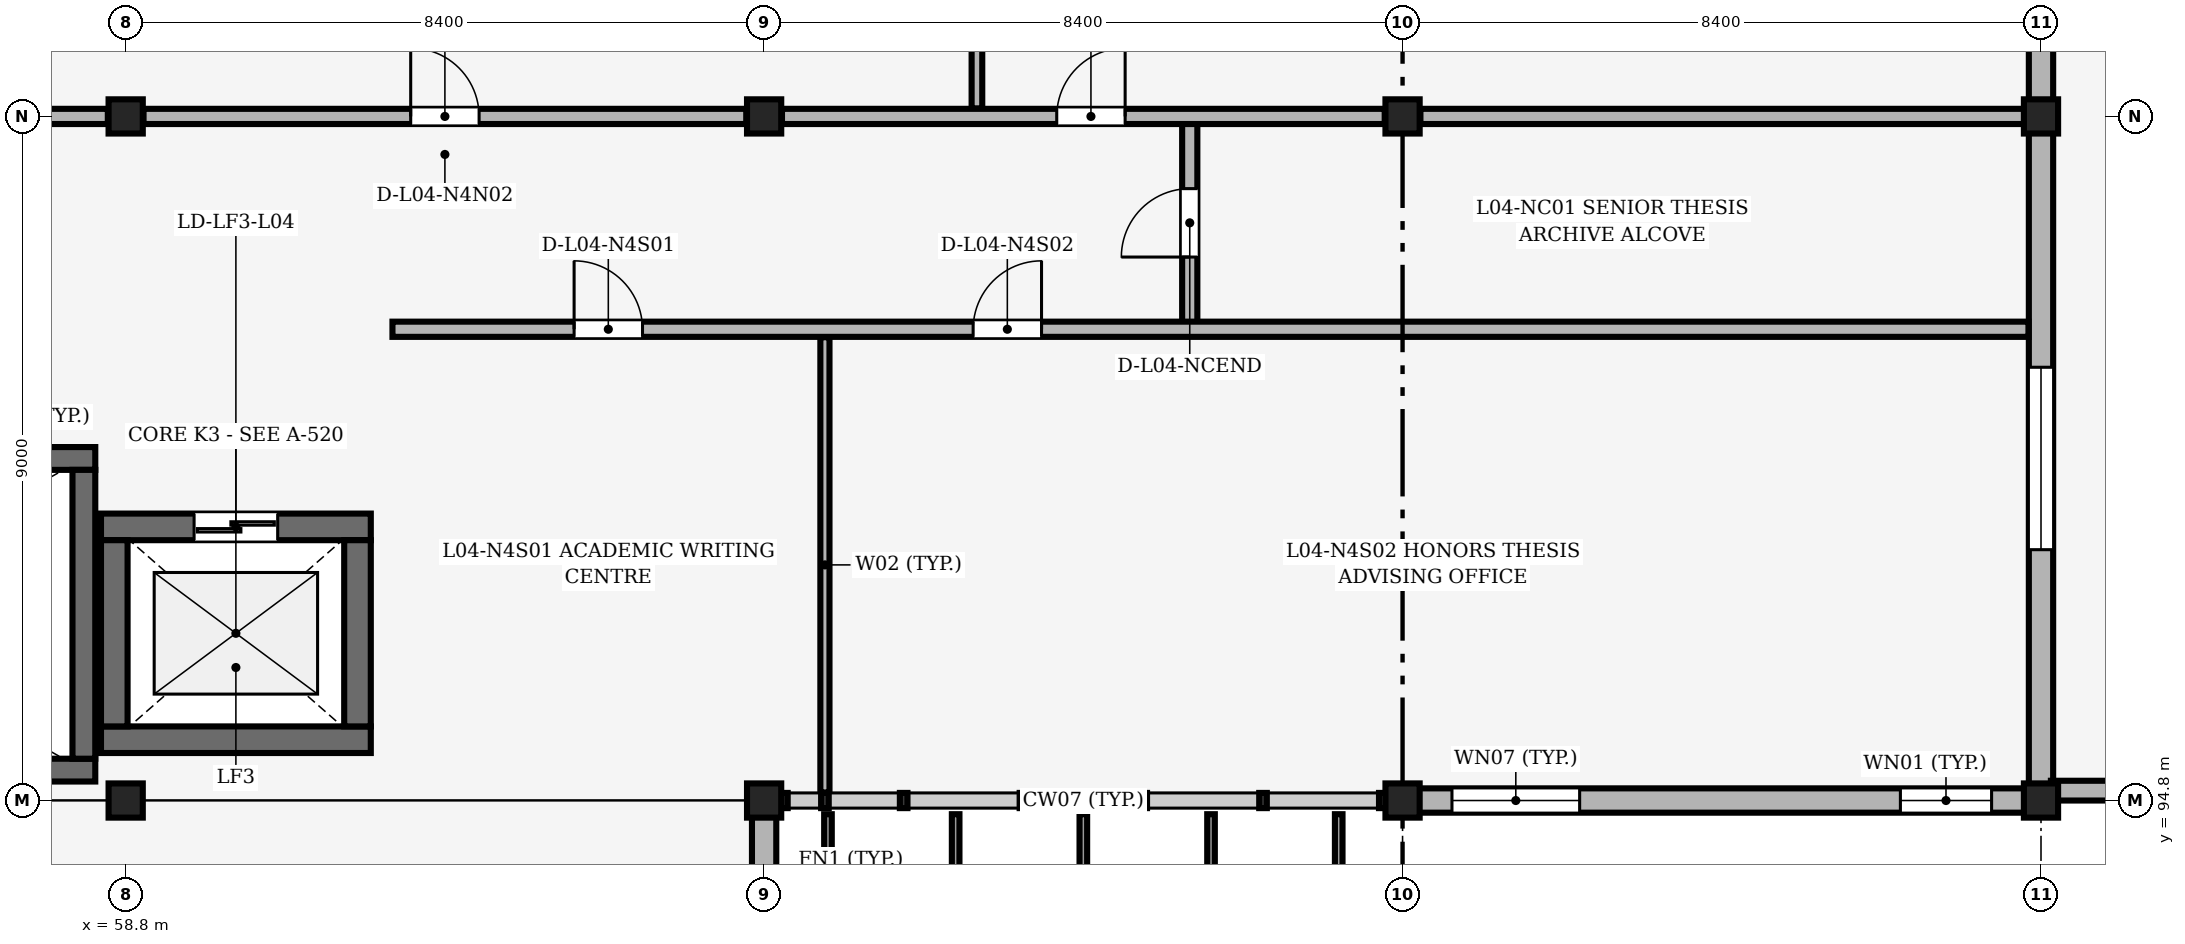
"""IFC4 building model, lengths in metres.
Left out: names, types, materials, properties, quantities, classifications, styles, units other than length and angle.
Written with IfcOpenShell. Run it as: python <this file> out.ifc"""

import sys

from ifc_helpers import new_model, si_unit, direction, frame, frame_2d, origin, origin_2d, place, context, subcontext, project, spatial, rectangle, extrude, element, fill, save


model = new_model("IFC4")
c1 = context("Model", 3, precision=1e-05, world=origin(), true_north=direction((0.0, 1.0)))
c2 = subcontext(c1, "Body", "Model", "MODEL_VIEW")
j1 = project(units=[si_unit("LENGTHUNIT", "METRE"), si_unit("PLANEANGLEUNIT", "RADIAN")], contexts=[c1])
p1 = place(None, origin())
s1 = spatial("IfcSite", under=j1, at=p1, CompositionType="ELEMENT")
p2 = place(p1, origin())
s2 = spatial("IfcBuilding", under=s1, at=p2, CompositionType="ELEMENT")
p3 = place(p2, frame((0.0, 0.0, 17.4)))
s3 = spatial("IfcBuildingStorey", under=s2, at=p3, CompositionType="ELEMENT", Elevation=17.4)
for number, where, z_axis, x_axis in (
    (1, (58.8, 94.8, 0.0), (0.0, 0.0, 1.0), (1.0, 0.0, 0.0)),
    (2, (58.8, 103.8, 0.0), (0.0, 0.0, 1.0), (1.0, 0.0, 0.0)),
    (3, (67.2, 94.8, 0.0), (0.0, 0.0, 1.0), (1.0, 0.0, 0.0)),
    (4, (67.2, 103.8, 0.0), (0.0, 0.0, 1.0), (1.0, 0.0, 0.0)),
    (5, (75.6, 94.8, 0.0), (0.0, 0.0, 1.0), (1.0, 0.0, 0.0)),
    (6, (75.6, 103.8, 0.0), (0.0, 0.0, 1.0), (1.0, 0.0, 0.0)),
    (7, (84.0, 94.8, 0.0), (0.0, 0.0, 1.0), (1.0, 0.0, 0.0)),
    (8, (84.0, 103.8, 0.0), (0.0, 0.0, 1.0), (1.0, 0.0, 0.0)),
):
    element("IfcColumn", number, at=place(p3, frame(where, z_axis=z_axis, x_axis=x_axis)), inside=s3, PredefinedType="COLUMN", context=c2, shape_type="SweptSolid", body=[
        extrude(rectangle(XDim=0.45, YDim=0.45, at=origin_2d()), origin(), (0.0, 0.0, 1.0), 4.2),
    ])
p4 = place(p3, frame((67.2, 86.0, 0.0), z_axis=(0.0, 0.0, 1.0), x_axis=(0.0, 1.0, 0.0)))
e9 = element("IfcWall", 9, at=p4, inside=s3, PredefinedType="SOLIDWALL", context=c2, shape_type="SweptSolid", body=[
    extrude(rectangle(XDim=8.6, YDim=0.32, at=frame_2d((4.3, 0.0))), origin(), (0.0, 0.0, 1.0), 3.43),
])
p5 = place(p4, frame((3.1, 0.0, 0.9)))
e10 = element("IfcOpeningElement", 10, at=p5, cuts=e9, PredefinedType="OPENING", context=c2, shape_type="SweptSolid", body=[
    extrude(rectangle(XDim=2.4, YDim=1.8, at=frame_2d((1.2, 0.9))), frame((0.0, 0.17, 0.0), z_axis=(0.0, -1.0, 0.0), x_axis=(1.0, 0.0, 0.0)), (0.0, 0.0, 1.0), 0.34),
])
p6 = place(p3, frame((75.8, 94.8, 0.0), z_axis=(0.0, 0.0, 1.0), x_axis=(1.0, 0.0, 0.0)))
e11 = element("IfcWall", 11, at=p6, inside=s3, PredefinedType="SOLIDWALL", context=c2, shape_type="SweptSolid", body=[
    extrude(rectangle(XDim=8.0, YDim=0.32, at=frame_2d((4.0, 0.0))), origin(), (0.0, 0.0, 1.0), 3.48),
])
p7 = place(p6, frame((0.45, 0.0, 0.9)))
e12 = element("IfcOpeningElement", 12, at=p7, cuts=e11, PredefinedType="OPENING", context=c2, shape_type="SweptSolid", body=[
    extrude(rectangle(XDim=1.68, YDim=2.4, at=frame_2d((0.84, 1.2))), frame((0.0, 0.17, 0.0), z_axis=(0.0, -1.0, 0.0), x_axis=(1.0, 0.0, 0.0)), (0.0, 0.0, 1.0), 0.34),
])
p8 = place(p6, frame((6.35, 0.0, 0.9)))
e13 = element("IfcOpeningElement", 13, at=p8, cuts=e11, PredefinedType="OPENING", context=c2, shape_type="SweptSolid", body=[
    extrude(rectangle(XDim=1.2, YDim=1.5, at=frame_2d((0.6, 0.75))), frame((0.0, 0.17, 0.0), z_axis=(0.0, -1.0, 0.0), x_axis=(1.0, 0.0, 0.0)), (0.0, 0.0, 1.0), 0.34),
])
p9 = place(p3, frame((84.0, 95.0, 0.0), z_axis=(0.0, 0.0, 1.0), x_axis=(0.0, 1.0, 0.0)))
e14 = element("IfcWall", 14, at=p9, inside=s3, PredefinedType="SOLIDWALL", context=c2, shape_type="SweptSolid", body=[
    extrude(rectangle(XDim=8.6, YDim=0.32, at=frame_2d((4.3, 0.0))), origin(), (0.0, 0.0, 1.0), 3.48),
])
p10 = place(p9, frame((3.1, 0.0, 0.9)))
e15 = element("IfcOpeningElement", 15, at=p10, cuts=e14, PredefinedType="OPENING", context=c2, shape_type="SweptSolid", body=[
    extrude(rectangle(XDim=2.4, YDim=1.8, at=frame_2d((1.2, 0.9))), frame((0.0, 0.17, 0.0), z_axis=(0.0, -1.0, 0.0), x_axis=(1.0, 0.0, 0.0)), (0.0, 0.0, 1.0), 0.34),
])
p11 = place(p3, frame((84.0, 104.0, 0.0), z_axis=(0.0, 0.0, 1.0), x_axis=(0.0, 1.0, 0.0)))
e16 = element("IfcWall", 16, at=p11, inside=s3, PredefinedType="SOLIDWALL", context=c2, shape_type="SweptSolid", body=[
    extrude(rectangle(XDim=8.6, YDim=0.32, at=frame_2d((4.3, 0.0))), origin(), (0.0, 0.0, 1.0), 3.43),
])
p12 = place(p11, frame((3.1, 0.0, 0.9)))
e17 = element("IfcOpeningElement", 17, at=p12, cuts=e16, PredefinedType="OPENING", context=c2, shape_type="SweptSolid", body=[
    extrude(rectangle(XDim=2.4, YDim=1.8, at=frame_2d((1.2, 0.9))), frame((0.0, 0.17, 0.0), z_axis=(0.0, -1.0, 0.0), x_axis=(1.0, 0.0, 0.0)), (0.0, 0.0, 1.0), 0.34),
])
p13 = place(p3, frame((84.13, 94.93, 0.0), z_axis=(0.0, 0.0, 1.0), x_axis=(1.0, 0.0, 0.0)))
e18 = element("IfcWall", 18, at=p13, inside=s3, PredefinedType="PARAPET", context=c2, shape_type="SweptSolid", body=[
    extrude(rectangle(XDim=33.34, YDim=0.26, at=frame_2d((16.67, 0.0))), origin(), (0.0, 0.0, 1.0), 0.85),
])
for number, where, z_axis, x_axis in (
    (19, (50.8, 95.2, 0.0), (0.0, 0.0, 1.0), (1.0, 0.0, 0.0)),
    (20, (50.8, 99.3, 0.0), (0.0, 0.0, 1.0), (1.0, 0.0, 0.0)),
):
    element("IfcWall", number, at=place(p3, frame(where, z_axis=z_axis, x_axis=x_axis)), inside=s3, PredefinedType="SHEAR", context=c2, shape_type="SweptSolid", body=[
        extrude(rectangle(XDim=7.6, YDim=0.3, at=frame_2d((3.8, 0.0))), origin(), (0.0, 0.0, 1.0), 4.025),
    ])
p14 = place(p3, frame((58.25, 95.35, 0.0), z_axis=(0.0, 0.0, 1.0), x_axis=(0.0, 1.0, 0.0)))
e21 = element("IfcWall", 21, at=p14, inside=s3, PredefinedType="SHEAR", context=c2, shape_type="SweptSolid", body=[
    extrude(rectangle(XDim=3.8, YDim=0.3, at=frame_2d((1.9, 0.0))), origin(), (0.0, 0.0, 1.0), 4.025),
])
p15 = place(p3, frame((58.475, 95.6, 0.0), z_axis=(0.0, 0.0, 1.0), x_axis=(1.0, 0.0, 0.0)))
e22 = element("IfcWall", 22, at=p15, inside=s3, PredefinedType="SHEAR", context=c2, shape_type="SweptSolid", body=[
    extrude(rectangle(XDim=3.55, YDim=0.35, at=frame_2d((1.775, 0.0))), origin(), (0.0, 0.0, 1.0), 3.92),
])
p16 = place(p3, frame((58.475, 98.4, 0.0), z_axis=(0.0, 0.0, 1.0), x_axis=(1.0, 0.0, 0.0)))
e23 = element("IfcWall", 23, at=p16, inside=s3, PredefinedType="SHEAR", context=c2, shape_type="SweptSolid", body=[
    extrude(rectangle(XDim=3.55, YDim=0.35, at=frame_2d((1.775, 0.0))), origin(), (0.0, 0.0, 1.0), 3.92),
])
p17 = place(p16, frame((1.225, 0.0, 0.0)))
e24 = element("IfcOpeningElement", 24, at=p17, cuts=e23, PredefinedType="OPENING", context=c2, shape_type="SweptSolid", body=[
    extrude(rectangle(XDim=1.1, YDim=2.2, at=frame_2d((0.55, 1.1))), frame((0.0, 0.185, 0.0), z_axis=(0.0, -1.0, 0.0), x_axis=(1.0, 0.0, 0.0)), (0.0, 0.0, 1.0), 0.37),
])
for number, where, z_axis, x_axis in (
    (25, (58.65, 95.775, 0.0), (0.0, 0.0, 1.0), (0.0, 1.0, 0.0)),
    (26, (61.85, 95.775, 0.0), (0.0, 0.0, 1.0), (0.0, 1.0, 0.0)),
):
    element("IfcWall", number, at=place(p3, frame(where, z_axis=z_axis, x_axis=x_axis)), inside=s3, PredefinedType="SHEAR", context=c2, shape_type="SweptSolid", body=[
        extrude(rectangle(XDim=2.45, YDim=0.35, at=frame_2d((1.225, 0.0))), origin(), (0.0, 0.0, 1.0), 3.92),
    ])
p18 = place(p3, frame((72.8, 101.01, 0.0), z_axis=(0.0, 0.0, 1.0), x_axis=(0.0, 1.0, 0.0)))
e27 = element("IfcWall", 27, at=p18, inside=s3, PredefinedType="PARTITIONING", context=c2, shape_type="SweptSolid", body=[
    extrude(rectangle(XDim=2.78, YDim=0.2, at=frame_2d((1.39, 0.0))), origin(), (0.0, 0.0, 1.0), 3.9),
])
p19 = place(p18, frame((0.94, 0.0, 0.0)))
e28 = element("IfcOpeningElement", 28, at=p19, cuts=e27, PredefinedType="OPENING", context=c2, shape_type="SweptSolid", body=[
    extrude(rectangle(XDim=0.9, YDim=2.1, at=frame_2d((0.45, 1.05))), frame((0.0, 0.11, 0.0), z_axis=(0.0, -1.0, 0.0), x_axis=(1.0, 0.0, 0.0)), (0.0, 0.0, 1.0), 0.22),
])
p20 = place(p3, frame((70.0, 103.905, 0.0), z_axis=(0.0, 0.0, 1.0), x_axis=(0.0, 1.0, 0.0)))
e29 = element("IfcWall", 29, at=p20, inside=s3, PredefinedType="PARTITIONING", context=c2, shape_type="SweptSolid", body=[
    extrude(rectangle(XDim=8.73, YDim=0.14, at=frame_2d((4.365, 0.0))), origin(), (0.0, 0.0, 1.0), 3.9),
])
p21 = place(p3, frame((50.635, 103.8, 0.0), z_axis=(0.0, 0.0, 1.0), x_axis=(1.0, 0.0, 0.0)))
e30 = element("IfcWall", 30, at=p21, inside=s3, PredefinedType="PARTITIONING", context=c2, shape_type="SweptSolid", body=[
    extrude(rectangle(XDim=7.93, YDim=0.2, at=frame_2d((3.965, 0.0))), origin(), (0.0, 0.0, 1.0), 3.29),
])
p22 = place(p3, frame((59.035, 103.8, 0.0), z_axis=(0.0, 0.0, 1.0), x_axis=(1.0, 0.0, 0.0)))
e31 = element("IfcWall", 31, at=p22, inside=s3, PredefinedType="PARTITIONING", context=c2, shape_type="SweptSolid", body=[
    extrude(rectangle(XDim=7.93, YDim=0.2, at=frame_2d((3.965, 0.0))), origin(), (0.0, 0.0, 1.0), 3.43),
])
p23 = place(p22, frame((3.515, 0.0, 0.0)))
e32 = element("IfcOpeningElement", 32, at=p23, cuts=e31, PredefinedType="OPENING", context=c2, shape_type="SweptSolid", body=[
    extrude(rectangle(XDim=0.9, YDim=2.1, at=frame_2d((0.45, 1.05))), frame((0.0, 0.11, 0.0), z_axis=(0.0, -1.0, 0.0), x_axis=(1.0, 0.0, 0.0)), (0.0, 0.0, 1.0), 0.22),
])
p24 = place(p3, frame((67.435, 103.8, 0.0), z_axis=(0.0, 0.0, 1.0), x_axis=(1.0, 0.0, 0.0)))
e33 = element("IfcWall", 33, at=p24, inside=s3, PredefinedType="PARTITIONING", context=c2, shape_type="SweptSolid", body=[
    extrude(rectangle(XDim=7.93, YDim=0.2, at=frame_2d((3.965, 0.0))), origin(), (0.0, 0.0, 1.0), 3.48),
])
p25 = place(p24, frame((3.615, 0.0, 0.0)))
e34 = element("IfcOpeningElement", 34, at=p25, cuts=e33, PredefinedType="OPENING", context=c2, shape_type="SweptSolid", body=[
    extrude(rectangle(XDim=0.9, YDim=2.1, at=frame_2d((0.45, 1.05))), frame((0.0, 0.11, 0.0), z_axis=(0.0, -1.0, 0.0), x_axis=(1.0, 0.0, 0.0)), (0.0, 0.0, 1.0), 0.22),
])
p26 = place(p3, frame((75.835, 103.8, 0.0), z_axis=(0.0, 0.0, 1.0), x_axis=(1.0, 0.0, 0.0)))
e35 = element("IfcWall", 35, at=p26, inside=s3, PredefinedType="PARTITIONING", context=c2, shape_type="SweptSolid", body=[
    extrude(rectangle(XDim=8.0, YDim=0.2, at=frame_2d((4.0, 0.0))), origin(), (0.0, 0.0, 1.0), 3.43),
])
p27 = place(p3, frame((68.0, 94.905, 0.0), z_axis=(0.0, 0.0, 1.0), x_axis=(0.0, 1.0, 0.0)))
e36 = element("IfcWall", 36, at=p27, inside=s3, PredefinedType="PARTITIONING", context=c2, shape_type="SweptSolid", body=[
    extrude(rectangle(XDim=5.99, YDim=0.12, at=frame_2d((2.995, 0.0))), origin(), (0.0, 0.0, 1.0), 3.9),
])
p28 = place(p3, frame((62.31, 101.0, 0.0), z_axis=(0.0, 0.0, 1.0), x_axis=(1.0, 0.0, 0.0)))
e37 = element("IfcWall", 37, at=p28, inside=s3, PredefinedType="PARTITIONING", context=c2, shape_type="SweptSolid", body=[
    extrude(rectangle(XDim=21.525, YDim=0.2, at=frame_2d((10.762, 0.0))), origin(), (0.0, 0.0, 1.0), 3.451),
])
p29 = place(p28, frame((2.39, 0.0, 0.0)))
e38 = element("IfcOpeningElement", 38, at=p29, cuts=e37, PredefinedType="OPENING", context=c2, shape_type="SweptSolid", body=[
    extrude(rectangle(XDim=0.9, YDim=2.1, at=frame_2d((0.45, 1.05))), frame((0.0, 0.11, 0.0), z_axis=(0.0, -1.0, 0.0), x_axis=(1.0, 0.0, 0.0)), (0.0, 0.0, 1.0), 0.22),
])
p30 = place(p28, frame((7.64, 0.0, 0.0)))
e39 = element("IfcOpeningElement", 39, at=p30, cuts=e37, PredefinedType="OPENING", context=c2, shape_type="SweptSolid", body=[
    extrude(rectangle(XDim=0.9, YDim=2.1, at=frame_2d((0.45, 1.05))), frame((0.0, 0.11, 0.0), z_axis=(0.0, -1.0, 0.0), x_axis=(1.0, 0.0, 0.0)), (0.0, 0.0, 1.0), 0.22),
])
p31 = place(p7, origin())
e40 = element("IfcWindow", 40, at=p31, inside=s3, PartitioningType="SINGLE_PANEL", PredefinedType="WINDOW", context=c2, shape_type="SweptSolid", body=[
    extrude(rectangle(XDim=1.68, YDim=2.4, at=frame_2d((0.84, 1.2))), frame((0.0, 0.03, 0.0), z_axis=(0.0, -1.0, 0.0), x_axis=(1.0, 0.0, 0.0)), (0.0, 0.0, 1.0), 0.06),
])
fill(e12, e40)
p32 = place(p8, origin())
e41 = element("IfcWindow", 41, at=p32, inside=s3, PartitioningType="SINGLE_PANEL", PredefinedType="WINDOW", context=c2, shape_type="SweptSolid", body=[
    extrude(rectangle(XDim=1.2, YDim=1.5, at=frame_2d((0.6, 0.75))), frame((0.0, 0.03, 0.0), z_axis=(0.0, -1.0, 0.0), x_axis=(1.0, 0.0, 0.0)), (0.0, 0.0, 1.0), 0.06),
])
fill(e13, e41)
p33 = place(p10, origin())
e42 = element("IfcWindow", 42, at=p33, inside=s3, PartitioningType="SINGLE_PANEL", PredefinedType="WINDOW", context=c2, shape_type="SweptSolid", body=[
    extrude(rectangle(XDim=2.4, YDim=1.8, at=frame_2d((1.2, 0.9))), frame((0.0, 0.03, 0.0), z_axis=(0.0, -1.0, 0.0), x_axis=(1.0, 0.0, 0.0)), (0.0, 0.0, 1.0), 0.06),
])
fill(e15, e42)
p34 = place(p17, origin())
e43 = element("IfcDoor", 43, at=p34, inside=s3, OperationType="DOUBLE_DOOR_SLIDING", PredefinedType="DOOR", context=c2, shape_type="SweptSolid", body=[
    extrude(rectangle(XDim=1.1, YDim=2.2, at=frame_2d((0.55, 1.1))), frame((0.0, 0.025, 0.0), z_axis=(0.0, -1.0, 0.0), x_axis=(1.0, 0.0, 0.0)), (0.0, 0.0, 1.0), 0.05),
])
fill(e24, e43)
p35 = place(p19, origin())
e44 = element("IfcDoor", 44, at=p35, inside=s3, OperationType="SINGLE_SWING_LEFT", PredefinedType="DOOR", context=c2, shape_type="SweptSolid", body=[
    extrude(rectangle(XDim=0.9, YDim=2.1, at=frame_2d((0.45, 1.05))), frame((0.0, 0.025, 0.0), z_axis=(0.0, -1.0, 0.0), x_axis=(1.0, 0.0, 0.0)), (0.0, 0.0, 1.0), 0.05),
])
fill(e28, e44)
p36 = place(p23, origin())
e45 = element("IfcDoor", 45, at=p36, inside=s3, OperationType="SINGLE_SWING_LEFT", PredefinedType="DOOR", context=c2, shape_type="SweptSolid", body=[
    extrude(rectangle(XDim=0.9, YDim=2.1, at=frame_2d((0.45, 1.05))), frame((0.0, 0.025, 0.0), z_axis=(0.0, -1.0, 0.0), x_axis=(1.0, 0.0, 0.0)), (0.0, 0.0, 1.0), 0.05),
])
fill(e32, e45)
p37 = place(p25, origin())
e46 = element("IfcDoor", 46, at=p37, inside=s3, OperationType="SINGLE_SWING_RIGHT", PredefinedType="DOOR", context=c2, shape_type="SweptSolid", body=[
    extrude(rectangle(XDim=0.9, YDim=2.1, at=frame_2d((0.45, 1.05))), frame((0.0, 0.025, 0.0), z_axis=(0.0, -1.0, 0.0), x_axis=(1.0, 0.0, 0.0)), (0.0, 0.0, 1.0), 0.05),
])
fill(e34, e46)
p38 = place(p29, origin())
e47 = element("IfcDoor", 47, at=p38, inside=s3, OperationType="SINGLE_SWING_LEFT", PredefinedType="DOOR", context=c2, shape_type="SweptSolid", body=[
    extrude(rectangle(XDim=0.9, YDim=2.1, at=frame_2d((0.45, 1.05))), frame((0.0, 0.025, 0.0), z_axis=(0.0, -1.0, 0.0), x_axis=(1.0, 0.0, 0.0)), (0.0, 0.0, 1.0), 0.05),
])
fill(e38, e47)
p39 = place(p30, origin())
e48 = element("IfcDoor", 48, at=p39, inside=s3, OperationType="SINGLE_SWING_RIGHT", PredefinedType="DOOR", context=c2, shape_type="SweptSolid", body=[
    extrude(rectangle(XDim=0.9, YDim=2.1, at=frame_2d((0.45, 1.05))), frame((0.0, 0.025, 0.0), z_axis=(0.0, -1.0, 0.0), x_axis=(1.0, 0.0, 0.0)), (0.0, 0.0, 1.0), 0.05),
])
fill(e39, e48)
save(model, sys.argv[1])
